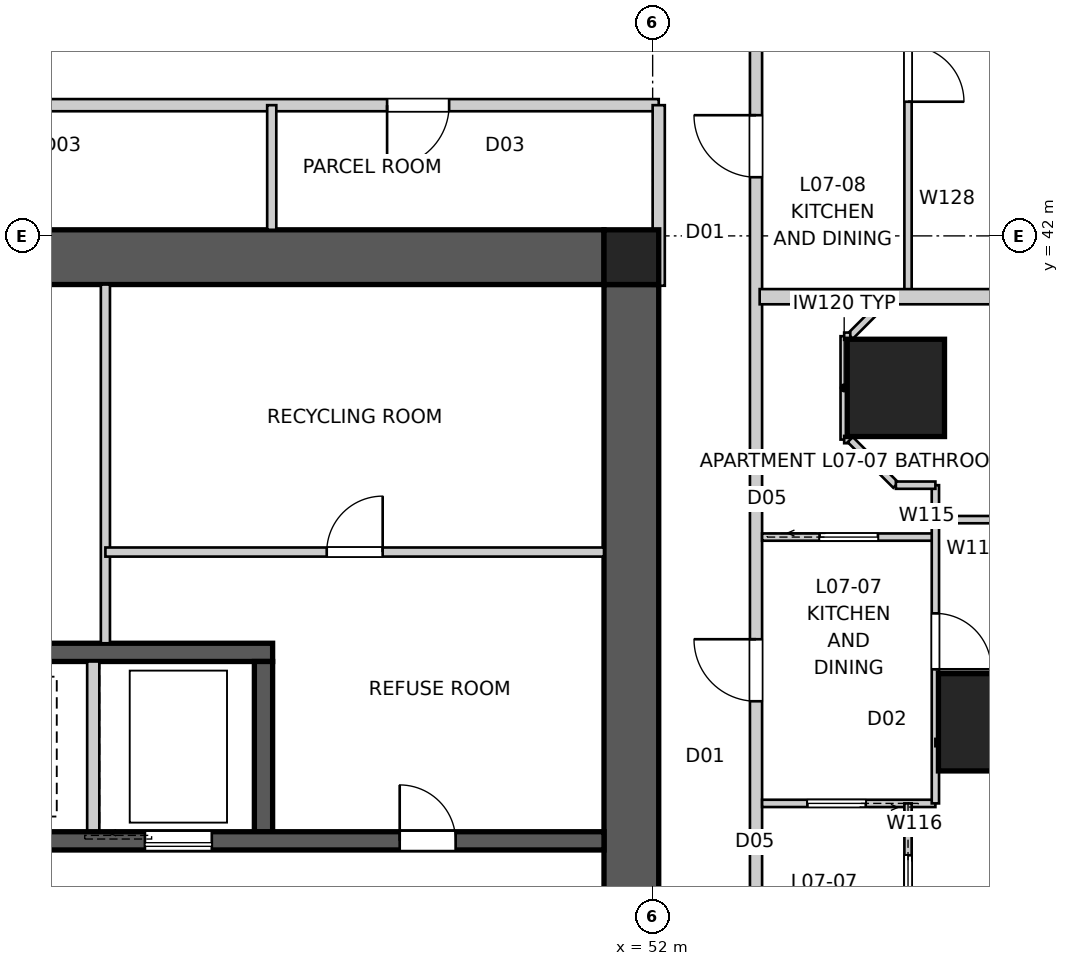
"""IFC4 building model, lengths in metres.
Left out: names, types, materials, properties, quantities, classifications, styles, units other than length and angle.
Written with IfcOpenShell. Run it as: python <this file> out.ifc"""

import sys

from ifc_helpers import new_model, si_unit, direction, frame, frame_2d, origin, origin_2d, place, context, subcontext, project, spatial, polyline, rectangle, outline, extrude, element, fill, save


model = new_model("IFC4")
c1 = context("Model", 3, precision=1e-05, world=origin(), true_north=direction((0.0, 1.0)))
c2 = subcontext(c1, "Body", "Model", "MODEL_VIEW")
j1 = project(units=[si_unit("LENGTHUNIT", "METRE"), si_unit("PLANEANGLEUNIT", "RADIAN")], contexts=[c1])
p1 = place(None, origin())
s1 = spatial("IfcSite", under=j1, at=p1, CompositionType="ELEMENT")
p2 = place(p1, origin())
s2 = spatial("IfcBuilding", under=s1, at=p2, CompositionType="ELEMENT")
p3 = place(p2, frame((0.0, 0.0, 28.6)))
s3 = spatial("IfcBuildingStorey", under=s2, at=p3, CompositionType="ELEMENT", Elevation=28.6)
p4 = place(p3, frame((28.8, 41.65, 0.0), z_axis=(0.0, 0.0, 1.0), x_axis=(1.0, 0.0, 0.0)))
e1 = element("IfcWall", 1, at=p4, inside=s3, PredefinedType="SHEAR", context=c2, shape_type="SweptSolid", body=[
    extrude(outline(polyline([(0.0, -0.45), (22.4, -0.45), (22.4, -0.025), (22.85, -0.025), (22.85, 0.025), (22.4, 0.025), (22.4, 0.45), (0.0, 0.45), (0.0, 0.025), (-0.45, 0.025), (-0.45, -0.025), (0.0, -0.025), (0.0, -0.45)])), origin(), (0.0, 0.0, 1.0), 3.4),
])
p5 = place(p3, frame((51.65, 18.8, 0.0), z_axis=(0.0, 0.0, 1.0), x_axis=(0.0, 1.0, 0.0)))
e2 = element("IfcWall", 2, at=p5, inside=s3, PredefinedType="SHEAR", context=c2, shape_type="SweptSolid", body=[
    extrude(outline(polyline([(0.0, -0.45), (22.4, -0.45), (22.4, -0.025), (22.85, -0.025), (22.85, 0.025), (22.4, 0.025), (22.4, 0.45), (0.0, 0.45), (0.0, 0.025), (-0.45, 0.025), (-0.45, -0.025), (0.0, -0.025), (0.0, -0.45)])), origin(), (0.0, 0.0, 1.0), 3.4),
])
p6 = place(p5, frame((11.14, 0.0, 0.0)))
e3 = element("IfcOpeningElement", 3, at=p6, cuts=e2, PredefinedType="OPENING", context=c2, shape_type="SweptSolid", body=[
    extrude(rectangle(XDim=1.02, YDim=2.4, at=frame_2d((0.51, 1.2))), frame((0.0, 0.46, 0.0), z_axis=(0.0, -1.0, 0.0), x_axis=(1.0, 0.0, 0.0)), (0.0, 0.0, 1.0), 0.92),
])
p7 = place(p3, frame((28.8, 32.05, 0.0), z_axis=(0.0, 0.0, 1.0), x_axis=(1.0, 0.0, 0.0)))
e4 = element("IfcWall", 4, at=p7, inside=s3, PredefinedType="SHEAR", context=c2, shape_type="SweptSolid", body=[
    extrude(rectangle(XDim=22.4, YDim=0.3, at=frame_2d((11.2, 0.0))), origin(), (0.0, 0.0, 1.0), 3.4),
])
p8 = place(p7, frame((19.04, 0.0, 0.0)))
e5 = element("IfcOpeningElement", 5, at=p8, cuts=e4, PredefinedType="OPENING", context=c2, shape_type="SweptSolid", body=[
    extrude(rectangle(XDim=0.92, YDim=2.1, at=frame_2d((0.46, 1.05))), frame((0.0, 0.16, 0.0), z_axis=(0.0, -1.0, 0.0), x_axis=(1.0, 0.0, 0.0)), (0.0, 0.0, 1.0), 0.32),
])
p9 = place(p7, frame((1.265, 0.0, 0.0)))
e6 = element("IfcOpeningElement", 6, at=p9, cuts=e4, PredefinedType="OPENING", context=c2, shape_type="SweptSolid", body=[
    extrude(rectangle(XDim=1.02, YDim=2.1, at=frame_2d((0.51, 1.05))), frame((0.0, 0.16, 0.0), z_axis=(0.0, -1.0, 0.0), x_axis=(1.0, 0.0, 0.0)), (0.0, 0.0, 1.0), 0.32),
])
p10 = place(p7, frame((4.015, 0.0, 0.0)))
e7 = element("IfcOpeningElement", 7, at=p10, cuts=e4, PredefinedType="OPENING", context=c2, shape_type="SweptSolid", body=[
    extrude(rectangle(XDim=0.92, YDim=2.1, at=frame_2d((0.46, 1.05))), frame((0.0, 0.16, 0.0), z_axis=(0.0, -1.0, 0.0), x_axis=(1.0, 0.0, 0.0)), (0.0, 0.0, 1.0), 0.32),
])
p11 = place(p7, frame((6.45, 0.0, 0.0)))
e8 = element("IfcOpeningElement", 8, at=p11, cuts=e4, PredefinedType="OPENING", context=c2, shape_type="SweptSolid", body=[
    extrude(rectangle(XDim=1.1, YDim=2.1, at=frame_2d((0.55, 1.05))), frame((0.0, 0.16, 0.0), z_axis=(0.0, -1.0, 0.0), x_axis=(1.0, 0.0, 0.0)), (0.0, 0.0, 1.0), 0.32),
])
p12 = place(p7, frame((9.25, 0.0, 0.0)))
e9 = element("IfcOpeningElement", 9, at=p12, cuts=e4, PredefinedType="OPENING", context=c2, shape_type="SweptSolid", body=[
    extrude(rectangle(XDim=1.1, YDim=2.1, at=frame_2d((0.55, 1.05))), frame((0.0, 0.16, 0.0), z_axis=(0.0, -1.0, 0.0), x_axis=(1.0, 0.0, 0.0)), (0.0, 0.0, 1.0), 0.32),
])
p13 = place(p7, frame((14.85, 0.0, 0.0)))
e10 = element("IfcOpeningElement", 10, at=p13, cuts=e4, PredefinedType="OPENING", context=c2, shape_type="SweptSolid", body=[
    extrude(rectangle(XDim=1.1, YDim=2.1, at=frame_2d((0.55, 1.05))), frame((0.0, 0.16, 0.0), z_axis=(0.0, -1.0, 0.0), x_axis=(1.0, 0.0, 0.0)), (0.0, 0.0, 1.0), 0.32),
])
p14 = place(p3, frame((34.25, 35.15, 0.0), z_axis=(0.0, 0.0, 1.0), x_axis=(1.0, 0.0, 0.0)))
e11 = element("IfcWall", 11, at=p14, inside=s3, PredefinedType="SHEAR", context=c2, shape_type="SweptSolid", body=[
    extrude(rectangle(XDim=11.5, YDim=0.3, at=frame_2d((5.75, 0.0))), origin(), (0.0, 0.0, 1.0), 3.4),
])
p15 = place(p3, frame((42.8, 32.2, 0.0), z_axis=(0.0, 0.0, 1.0), x_axis=(0.0, 1.0, 0.0)))
e12 = element("IfcWall", 12, at=p15, inside=s3, PredefinedType="SOLIDWALL", context=c2, shape_type="SweptSolid", body=[
    extrude(rectangle(XDim=2.8, YDim=0.2, at=frame_2d((1.4, 0.0))), origin(), (0.0, 0.0, 1.0), 3.4),
])
p16 = place(p3, frame((45.6, 32.2, 0.0), z_axis=(0.0, 0.0, 1.0), x_axis=(0.0, 1.0, 0.0)))
e13 = element("IfcWall", 13, at=p16, inside=s3, PredefinedType="SHEAR", context=c2, shape_type="SweptSolid", body=[
    extrude(rectangle(XDim=2.8, YDim=0.3, at=frame_2d((1.4, 0.0))), origin(), (0.0, 0.0, 1.0), 3.4),
])
p17 = place(p3, frame((51.65, 41.65, 0.0), z_axis=(0.0, 0.0, 1.0), x_axis=(1.0, 0.0, 0.0)))
e14 = element("IfcColumn", 14, at=p17, inside=s3, PredefinedType="COLUMN", context=c2, shape_type="SweptSolid", body=[
    extrude(rectangle(XDim=0.9, YDim=0.9, at=origin_2d()), origin(), (0.0, 0.0, 1.0), 3.4),
])
for number, where, z_axis, x_axis in (
    (15, (57.5, 34.0, 0.0), (0.0, 0.0, 1.0), (1.0, 0.0, 0.0)),
    (16, (56.0, 39.5, 0.0), (0.0, 0.0, 1.0), (1.0, 0.0, 0.0)),
):
    element("IfcColumn", number, at=place(p3, frame(where, z_axis=z_axis, x_axis=x_axis)), inside=s3, PredefinedType="COLUMN", context=c2, shape_type="SweptSolid", body=[
        extrude(rectangle(XDim=1.6, YDim=1.6, at=origin_2d()), origin(), (0.0, 0.0, 1.0), 3.4),
    ])
p18 = place(p3, frame((53.7, 13.7, 0.0), z_axis=(0.0, 0.0, 1.0), x_axis=(0.0, 1.0, 0.0)))
e17 = element("IfcWall", 17, at=p18, inside=s3, PredefinedType="PARTITIONING", context=c2, shape_type="SweptSolid", body=[
    extrude(rectangle(XDim=32.6, YDim=0.2, at=frame_2d((16.3, 0.0))), origin(), (0.0, 0.0, 1.0), 3.25),
])
p19 = place(p18, frame((2.315, 0.0, 0.0)))
e18 = element("IfcOpeningElement", 18, at=p19, cuts=e17, PredefinedType="OPENING", context=c2, shape_type="SweptSolid", body=[
    extrude(rectangle(XDim=1.02, YDim=2.34, at=frame_2d((0.51, 1.17))), frame((0.0, 0.11, 0.0), z_axis=(0.0, -1.0, 0.0), x_axis=(1.0, 0.0, 0.0)), (0.0, 0.0, 1.0), 0.22),
])
p20 = place(p18, frame((29.265, 0.0, 0.0)))
e19 = element("IfcOpeningElement", 19, at=p20, cuts=e17, PredefinedType="OPENING", context=c2, shape_type="SweptSolid", body=[
    extrude(rectangle(XDim=1.02, YDim=2.34, at=frame_2d((0.51, 1.17))), frame((0.0, 0.11, 0.0), z_axis=(0.0, -1.0, 0.0), x_axis=(1.0, 0.0, 0.0)), (0.0, 0.0, 1.0), 0.22),
])
p21 = place(p18, frame((20.646, 0.0, 0.0)))
e20 = element("IfcOpeningElement", 20, at=p21, cuts=e17, PredefinedType="OPENING", context=c2, shape_type="SweptSolid", body=[
    extrude(rectangle(XDim=1.02, YDim=2.34, at=frame_2d((0.51, 1.17))), frame((0.0, 0.11, 0.0), z_axis=(0.0, -1.0, 0.0), x_axis=(1.0, 0.0, 0.0)), (0.0, 0.0, 1.0), 0.22),
])
p22 = place(p18, frame((13.626, 0.0, 0.0)))
e21 = element("IfcOpeningElement", 21, at=p22, cuts=e17, PredefinedType="OPENING", context=c2, shape_type="SweptSolid", body=[
    extrude(rectangle(XDim=1.02, YDim=2.34, at=frame_2d((0.51, 1.17))), frame((0.0, 0.11, 0.0), z_axis=(0.0, -1.0, 0.0), x_axis=(1.0, 0.0, 0.0)), (0.0, 0.0, 1.0), 0.22),
])
p23 = place(p3, frame((66.0, 41.0, 0.0), z_axis=(0.0, 0.0, 1.0), x_axis=(-1.0, 0.0, 0.0)))
e22 = element("IfcWall", 22, at=p23, inside=s3, PredefinedType="PARTITIONING", context=c2, shape_type="SweptSolid", body=[
    extrude(rectangle(XDim=12.24, YDim=0.25, at=frame_2d((6.12, 0.0))), origin(), (0.0, 0.0, 1.0), 3.25),
])
p24 = place(p3, frame((43.0, 41.2, 0.0), z_axis=(0.0, 0.0, 1.0), x_axis=(0.0, -1.0, 0.0)))
e23 = element("IfcWall", 23, at=p24, inside=s3, PredefinedType="SOLIDWALL", context=c2, shape_type="SweptSolid", body=[
    extrude(rectangle(XDim=5.9, YDim=0.15, at=frame_2d((2.95, 0.0))), origin(), (0.0, 0.0, 1.0), 3.25),
])
p25 = place(p3, frame((43.0, 36.8, 0.0), z_axis=(0.0, 0.0, 1.0), x_axis=(1.0, 0.0, 0.0)))
e24 = element("IfcWall", 24, at=p25, inside=s3, PredefinedType="SOLIDWALL", context=c2, shape_type="SweptSolid", body=[
    extrude(rectangle(XDim=8.2, YDim=0.15, at=frame_2d((4.1, 0.0))), origin(), (0.0, 0.0, 1.0), 3.25),
])
p26 = place(p25, frame((3.64, 0.0, 0.0)))
e25 = element("IfcOpeningElement", 25, at=p26, cuts=e24, PredefinedType="OPENING", context=c2, shape_type="SweptSolid", body=[
    extrude(rectangle(XDim=0.92, YDim=2.1, at=frame_2d((0.46, 1.05))), frame((0.0, 0.085, 0.0), z_axis=(0.0, -1.0, 0.0), x_axis=(1.0, 0.0, 0.0)), (0.0, 0.0, 1.0), 0.17),
])
p27 = place(p3, frame((52.1, 44.15, 0.0), z_axis=(0.0, 0.0, 1.0), x_axis=(-1.0, 0.0, 0.0)))
e26 = element("IfcWall", 26, at=p27, inside=s3, PredefinedType="PARTITIONING", context=c2, shape_type="SweptSolid", body=[
    extrude(rectangle(XDim=24.2, YDim=0.2, at=frame_2d((12.1, 0.0))), origin(), (0.0, 0.0, 1.0), 3.25),
])
p28 = place(p27, frame((10.743, 0.0, 0.0)))
e27 = element("IfcOpeningElement", 27, at=p28, cuts=e26, PredefinedType="OPENING", context=c2, shape_type="SweptSolid", body=[
    extrude(rectangle(XDim=1.02, YDim=2.1, at=frame_2d((0.51, 1.05))), frame((0.0, 0.11, 0.0), z_axis=(0.0, -1.0, 0.0), x_axis=(1.0, 0.0, 0.0)), (0.0, 0.0, 1.0), 0.22),
])
p29 = place(p27, frame((19.636, 0.0, 0.0)))
e28 = element("IfcOpeningElement", 28, at=p29, cuts=e26, PredefinedType="OPENING", context=c2, shape_type="SweptSolid", body=[
    extrude(rectangle(XDim=1.02, YDim=2.1, at=frame_2d((0.51, 1.05))), frame((0.0, 0.11, 0.0), z_axis=(0.0, -1.0, 0.0), x_axis=(1.0, 0.0, 0.0)), (0.0, 0.0, 1.0), 0.22),
])
p30 = place(p27, frame((3.447, 0.0, 0.0)))
e29 = element("IfcOpeningElement", 29, at=p30, cuts=e26, PredefinedType="OPENING", context=c2, shape_type="SweptSolid", body=[
    extrude(rectangle(XDim=1.02, YDim=2.1, at=frame_2d((0.51, 1.05))), frame((0.0, 0.11, 0.0), z_axis=(0.0, -1.0, 0.0), x_axis=(1.0, 0.0, 0.0)), (0.0, 0.0, 1.0), 0.22),
])
p31 = place(p3, frame((52.1, 41.18, 0.0), z_axis=(0.0, 0.0, 1.0), x_axis=(0.0, 1.0, 0.0)))
e30 = element("IfcWall", 30, at=p31, inside=s3, PredefinedType="PARTITIONING", context=c2, shape_type="SweptSolid", body=[
    extrude(rectangle(XDim=2.97, YDim=0.2, at=frame_2d((1.485, 0.0))), origin(), (0.0, 0.0, 1.0), 3.25),
])
p32 = place(p3, frame((45.735, 42.1, 0.0), z_axis=(0.0, 0.0, 1.0), x_axis=(0.0, 1.0, 0.0)))
e31 = element("IfcWall", 31, at=p32, inside=s3, PredefinedType="SOLIDWALL", context=c2, shape_type="SweptSolid", body=[
    extrude(rectangle(XDim=2.05, YDim=0.15, at=frame_2d((1.025, 0.0))), origin(), (0.0, 0.0, 1.0), 2.796),
])
p33 = place(p3, frame((53.8, 37.046, 0.0), z_axis=(0.0, 0.0, 1.0), x_axis=(1.0, 0.0, 0.0)))
e32 = element("IfcWall", 32, at=p33, inside=s3, PredefinedType="PARTITIONING", context=c2, shape_type="SweptSolid", body=[
    extrude(rectangle(XDim=2.85, YDim=0.12, at=frame_2d((1.425, 0.0))), origin(), (0.0, 0.0, 1.0), 3.25),
])
p34 = place(p33, frame((0.945, 0.0, 0.0)))
e33 = element("IfcOpeningElement", 33, at=p34, cuts=e32, PredefinedType="OPENING", context=c2, shape_type="SweptSolid", body=[
    extrude(rectangle(XDim=0.96, YDim=2.1, at=frame_2d((0.48, 1.05))), frame((0.0, 0.07, 0.0), z_axis=(0.0, -1.0, 0.0), x_axis=(1.0, 0.0, 0.0)), (0.0, 0.0, 1.0), 0.14),
])
p35 = place(p3, frame((56.65, 32.666, 0.0), z_axis=(0.0, 0.0, 1.0), x_axis=(-1.0, 0.0, 0.0)))
e34 = element("IfcWall", 34, at=p35, inside=s3, PredefinedType="PARTITIONING", context=c2, shape_type="SweptSolid", body=[
    extrude(rectangle(XDim=2.85, YDim=0.12, at=frame_2d((1.425, 0.0))), origin(), (0.0, 0.0, 1.0), 3.25),
])
p36 = place(p35, frame((1.145, 0.0, 0.0)))
e35 = element("IfcOpeningElement", 35, at=p36, cuts=e34, PredefinedType="OPENING", context=c2, shape_type="SweptSolid", body=[
    extrude(rectangle(XDim=0.96, YDim=2.1, at=frame_2d((0.48, 1.05))), frame((0.0, 0.07, 0.0), z_axis=(0.0, -1.0, 0.0), x_axis=(1.0, 0.0, 0.0)), (0.0, 0.0, 1.0), 0.14),
])
p37 = place(p3, frame((56.65, 37.9, 0.0), z_axis=(0.0, 0.0, 1.0), x_axis=(0.0, -1.0, 0.0)))
e36 = element("IfcWall", 36, at=p37, inside=s3, PredefinedType="PARTITIONING", context=c2, shape_type="SweptSolid", body=[
    extrude(rectangle(XDim=5.234, YDim=0.12, at=frame_2d((2.617, 0.0))), origin(), (0.0, 0.0, 1.0), 2.55),
])
p38 = place(p37, frame((2.109, 0.0, 0.0)))
e37 = element("IfcOpeningElement", 37, at=p38, cuts=e36, PredefinedType="OPENING", context=c2, shape_type="SweptSolid", body=[
    extrude(rectangle(XDim=0.92, YDim=2.34, at=frame_2d((0.46, 1.17))), frame((0.0, 0.07, 0.0), z_axis=(0.0, -1.0, 0.0), x_axis=(1.0, 0.0, 0.0)), (0.0, 0.0, 1.0), 0.14),
])
p39 = place(p3, frame((55.9, 41.0, 0.0), z_axis=(0.0, 0.0, 1.0), x_axis=(-0.707106781187, -0.707106781187, 0.0)))
e38 = element("IfcWall", 38, at=p39, inside=s3, PredefinedType="PARTITIONING", context=c2, shape_type="SweptSolid", body=[
    extrude(rectangle(XDim=0.919, YDim=0.12, at=frame_2d((0.459, 0.0))), origin(), (0.0, 0.0, 1.0), 3.25),
])
p40 = place(p3, frame((55.15, 40.35, 0.0), z_axis=(0.0, 0.0, 1.0), x_axis=(0.0, -1.0, 0.0)))
e39 = element("IfcWall", 39, at=p40, inside=s3, PredefinedType="PARTITIONING", context=c2, shape_type="SweptSolid", body=[
    extrude(rectangle(XDim=1.7, YDim=0.12, at=frame_2d((0.85, 0.0))), origin(), (0.0, 0.0, 1.0), 3.25),
])
p41 = place(p3, frame((55.25, 38.65, 0.0), z_axis=(0.0, 0.0, 1.0), x_axis=(0.707106781187, -0.707106781187, 0.0)))
e40 = element("IfcWall", 40, at=p41, inside=s3, PredefinedType="PARTITIONING", context=c2, shape_type="SweptSolid", body=[
    extrude(rectangle(XDim=1.061, YDim=0.12, at=frame_2d((0.53, 0.0))), origin(), (0.0, 0.0, 1.0), 3.25),
])
p42 = place(p3, frame((56.0, 37.9, 0.0), z_axis=(0.0, 0.0, 1.0), x_axis=(1.0, 0.0, 0.0)))
e41 = element("IfcWall", 41, at=p42, inside=s3, PredefinedType="PARTITIONING", context=c2, shape_type="SweptSolid", body=[
    extrude(rectangle(XDim=0.65, YDim=0.12, at=frame_2d((0.325, 0.0))), origin(), (0.0, 0.0, 1.0), 3.25),
])
p43 = place(p3, frame((56.2, 32.666, 0.0), z_axis=(0.0, 0.0, 1.0), x_axis=(0.0, -1.0, 0.0)))
e42 = element("IfcWall", 42, at=p43, inside=s3, PredefinedType="PARTITIONING", context=c2, shape_type="SweptSolid", body=[
    extrude(rectangle(XDim=2.666, YDim=0.12, at=frame_2d((1.333, 0.0))), origin(), (0.0, 0.0, 1.0), 3.25),
])
p44 = place(p43, frame((0.853, 0.0, 0.0)))
e43 = element("IfcOpeningElement", 43, at=p44, cuts=e42, PredefinedType="OPENING", context=c2, shape_type="SweptSolid", body=[
    extrude(rectangle(XDim=0.96, YDim=2.1, at=frame_2d((0.48, 1.05))), frame((0.0, 0.07, 0.0), z_axis=(0.0, -1.0, 0.0), x_axis=(1.0, 0.0, 0.0)), (0.0, 0.0, 1.0), 0.14),
])
p45 = place(p3, frame((56.65, 33.667, 0.0), z_axis=(0.0, 0.0, 1.0), x_axis=(1.0, 0.0, 0.0)))
e44 = element("IfcWall", 44, at=p45, inside=s3, PredefinedType="PARTITIONING", context=c2, shape_type="SweptSolid", body=[
    extrude(rectangle(XDim=9.31, YDim=0.12, at=frame_2d((4.655, 0.0))), origin(), (0.0, 0.0, 1.0), 3.25),
])
p46 = place(p3, frame((65.96, 37.333, 0.0), z_axis=(0.0, 0.0, 1.0), x_axis=(-1.0, 0.0, 0.0)))
e45 = element("IfcWall", 45, at=p46, inside=s3, PredefinedType="PARTITIONING", context=c2, shape_type="SweptSolid", body=[
    extrude(rectangle(XDim=9.31, YDim=0.12, at=frame_2d((4.655, 0.0))), origin(), (0.0, 0.0, 1.0), 3.25),
])
p47 = place(p46, frame((4.175, 0.0, 0.0)))
e46 = element("IfcOpeningElement", 46, at=p47, cuts=e45, PredefinedType="OPENING", context=c2, shape_type="SweptSolid", body=[
    extrude(rectangle(XDim=0.92, YDim=2.34, at=frame_2d((0.46, 1.17))), frame((0.0, 0.07, 0.0), z_axis=(0.0, -1.0, 0.0), x_axis=(1.0, 0.0, 0.0)), (0.0, 0.0, 1.0), 0.14),
])
p48 = place(p3, frame((56.2, 48.333, 0.0), z_axis=(0.0, 0.0, 1.0), x_axis=(0.0, -1.0, 0.0)))
e47 = element("IfcWall", 47, at=p48, inside=s3, PredefinedType="PARTITIONING", context=c2, shape_type="SweptSolid", body=[
    extrude(rectangle(XDim=7.333, YDim=0.12, at=frame_2d((3.667, 0.0))), origin(), (0.0, 0.0, 1.0), 3.25),
])
p49 = place(p48, frame((3.207, 0.0, 0.0)))
e48 = element("IfcOpeningElement", 48, at=p49, cuts=e47, PredefinedType="OPENING", context=c2, shape_type="SweptSolid", body=[
    extrude(rectangle(XDim=0.92, YDim=2.34, at=frame_2d((0.46, 1.17))), frame((0.0, 0.07, 0.0), z_axis=(0.0, -1.0, 0.0), x_axis=(1.0, 0.0, 0.0)), (0.0, 0.0, 1.0), 0.14),
])
for number, where, z_axis, x_axis in (
    (49, (55.15, 40.35, 0.0), (0.0, 0.0, 1.0), (1.0, 0.0, 0.0)),
    (50, (55.15, 38.65, 0.0), (0.0, 0.0, 1.0), (1.0, 0.0, 0.0)),
):
    element("IfcWall", number, at=place(p3, frame(where, z_axis=z_axis, x_axis=x_axis)), inside=s3, PredefinedType="PARTITIONING", context=c2, shape_type="SweptSolid", body=[
        extrude(rectangle(XDim=0.1, YDim=0.12, at=frame_2d((0.05, 0.0))), origin(), (0.0, 0.0, 1.0), 3.25),
    ])
p50 = place(p8, origin())
e51 = element("IfcDoor", 51, at=p50, inside=s3, OperationType="SINGLE_SWING_LEFT", PredefinedType="DOOR", context=c2, shape_type="SweptSolid", body=[
    extrude(rectangle(XDim=0.92, YDim=2.1, at=frame_2d((0.46, 1.05))), frame((0.0, 0.025, 0.0), z_axis=(0.0, -1.0, 0.0), x_axis=(1.0, 0.0, 0.0)), (0.0, 0.0, 1.0), 0.05),
])
fill(e5, e51)
p51 = place(p30, origin())
e52 = element("IfcDoor", 52, at=p51, inside=s3, OperationType="SINGLE_SWING_RIGHT", PredefinedType="DOOR", context=c2, shape_type="SweptSolid", body=[
    extrude(rectangle(XDim=1.02, YDim=2.1, at=frame_2d((0.51, 1.05))), frame((0.0, 0.025, 0.0), z_axis=(0.0, -1.0, 0.0), x_axis=(1.0, 0.0, 0.0)), (0.0, 0.0, 1.0), 0.05),
])
fill(e29, e52)
p52 = place(p20, origin())
e53 = element("IfcDoor", 53, at=p52, inside=s3, OperationType="SINGLE_SWING_RIGHT", PredefinedType="DOOR", context=c2, shape_type="SweptSolid", body=[
    extrude(rectangle(XDim=1.02, YDim=2.34, at=frame_2d((0.51, 1.17))), frame((0.0, 0.025, 0.0), z_axis=(0.0, -1.0, 0.0), x_axis=(1.0, 0.0, 0.0)), (0.0, 0.0, 1.0), 0.05),
])
fill(e19, e53)
p53 = place(p21, origin())
e54 = element("IfcDoor", 54, at=p53, inside=s3, OperationType="SINGLE_SWING_RIGHT", PredefinedType="DOOR", context=c2, shape_type="SweptSolid", body=[
    extrude(rectangle(XDim=1.02, YDim=2.34, at=frame_2d((0.51, 1.17))), frame((0.0, 0.025, 0.0), z_axis=(0.0, -1.0, 0.0), x_axis=(1.0, 0.0, 0.0)), (0.0, 0.0, 1.0), 0.05),
])
fill(e20, e54)
p54 = place(p26, origin())
e55 = element("IfcDoor", 55, at=p54, inside=s3, OperationType="SINGLE_SWING_RIGHT", PredefinedType="DOOR", context=c2, shape_type="SweptSolid", body=[
    extrude(rectangle(XDim=0.92, YDim=2.1, at=frame_2d((0.46, 1.05))), frame((0.0, 0.025, 0.0), z_axis=(0.0, -1.0, 0.0), x_axis=(1.0, 0.0, 0.0)), (0.0, 0.0, 1.0), 0.05),
])
fill(e25, e55)
p55 = place(p49, origin())
e56 = element("IfcDoor", 56, at=p55, inside=s3, OperationType="SINGLE_SWING_RIGHT", PredefinedType="DOOR", context=c2, shape_type="SweptSolid", body=[
    extrude(rectangle(XDim=0.92, YDim=2.34, at=frame_2d((0.46, 1.17))), frame((0.0, 0.025, 0.0), z_axis=(0.0, -1.0, 0.0), x_axis=(1.0, 0.0, 0.0)), (0.0, 0.0, 1.0), 0.05),
])
fill(e48, e56)
p56 = place(p38, origin())
e57 = element("IfcDoor", 57, at=p56, inside=s3, OperationType="SINGLE_SWING_RIGHT", PredefinedType="DOOR", context=c2, shape_type="SweptSolid", body=[
    extrude(rectangle(XDim=0.92, YDim=2.34, at=frame_2d((0.46, 1.17))), frame((0.0, 0.025, 0.0), z_axis=(0.0, -1.0, 0.0), x_axis=(1.0, 0.0, 0.0)), (0.0, 0.0, 1.0), 0.05),
])
fill(e37, e57)
p57 = place(p34, origin())
e58 = element("IfcDoor", 58, at=p57, inside=s3, OperationType="SLIDING_TO_LEFT", PredefinedType="DOOR", context=c2, shape_type="SweptSolid", body=[
    extrude(rectangle(XDim=0.96, YDim=2.1, at=frame_2d((0.48, 1.05))), frame((0.0, 0.025, 0.0), z_axis=(0.0, -1.0, 0.0), x_axis=(1.0, 0.0, 0.0)), (0.0, 0.0, 1.0), 0.05),
])
fill(e33, e58)
p58 = place(p36, origin())
e59 = element("IfcDoor", 59, at=p58, inside=s3, OperationType="SLIDING_TO_LEFT", PredefinedType="DOOR", context=c2, shape_type="SweptSolid", body=[
    extrude(rectangle(XDim=0.96, YDim=2.1, at=frame_2d((0.48, 1.05))), frame((0.0, 0.025, 0.0), z_axis=(0.0, -1.0, 0.0), x_axis=(1.0, 0.0, 0.0)), (0.0, 0.0, 1.0), 0.05),
])
fill(e35, e59)
p59 = place(p44, origin())
e60 = element("IfcDoor", 60, at=p59, inside=s3, OperationType="SLIDING_TO_LEFT", PredefinedType="DOOR", context=c2, shape_type="SweptSolid", body=[
    extrude(rectangle(XDim=0.96, YDim=2.1, at=frame_2d((0.48, 1.05))), frame((0.0, 0.025, 0.0), z_axis=(0.0, -1.0, 0.0), x_axis=(1.0, 0.0, 0.0)), (0.0, 0.0, 1.0), 0.05),
])
fill(e43, e60)
p60 = place(p13, origin())
e61 = element("IfcDoor", 61, at=p60, inside=s3, OperationType="SLIDING_TO_LEFT", PredefinedType="DOOR", context=c2, shape_type="SweptSolid", body=[
    extrude(rectangle(XDim=1.1, YDim=2.1, at=frame_2d((0.55, 1.05))), frame((0.0, 0.025, 0.0), z_axis=(0.0, -1.0, 0.0), x_axis=(1.0, 0.0, 0.0)), (0.0, 0.0, 1.0), 0.05),
])
fill(e10, e61)
save(model, sys.argv[1])
